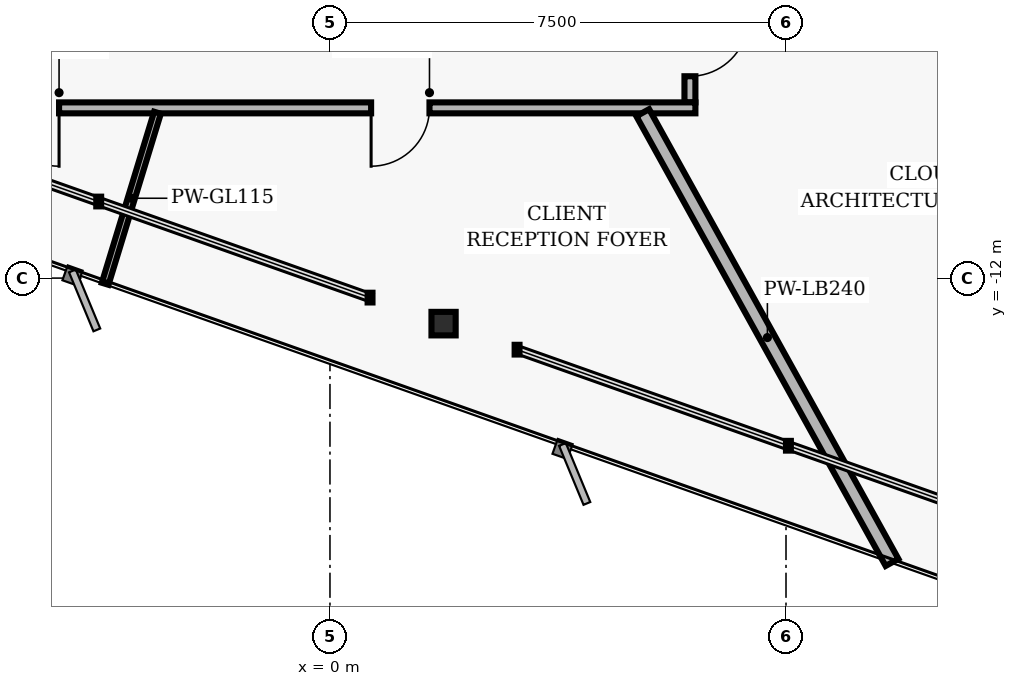
"""IFC4 building model, lengths in metres.
Left out: names, types, materials, properties, quantities, classifications, styles, units other than length and angle.
Written with IfcOpenShell. Run it as: python <this file> out.ifc"""

import sys

from ifc_helpers import new_model, si_unit, direction, frame, frame_2d, origin, origin_2d, place, context, subcontext, project, spatial, rectangle, i_section, extrude, element, fill, save


model = new_model("IFC4")
c1 = context("Model", 3, precision=1e-05, world=origin(), true_north=direction((0.0, 1.0)))
c2 = subcontext(c1, "Body", "Model", "MODEL_VIEW")
j1 = project(units=[si_unit("LENGTHUNIT", "METRE"), si_unit("PLANEANGLEUNIT", "RADIAN")], contexts=[c1])
p1 = place(None, origin())
s1 = spatial("IfcSite", under=j1, at=p1, CompositionType="ELEMENT")
p2 = place(p1, origin())
s2 = spatial("IfcBuilding", under=s1, at=p2, CompositionType="ELEMENT")
p3 = place(p2, frame((0.0, 0.0, 175.36)))
s3 = spatial("IfcBuildingStorey", under=s2, at=p3, CompositionType="ELEMENT", Elevation=175.36)
p4 = place(p3, frame((1.868, -12.749, 0.0), z_axis=(0.0, 0.0, 1.0), x_axis=(1.0, 0.0, 0.0)))
e1 = element("IfcColumn", 1, at=p4, inside=s3, PredefinedType="COLUMN", context=c2, shape_type="SweptSolid", body=[
    extrude(i_section(OverallWidth=0.398, OverallDepth=0.387, WebThickness=0.021, FlangeThickness=0.033, FilletRadius=0.018, at=origin_2d()), origin(), (0.0, 0.0, 1.0), 3.04),
])
p5 = place(p3, frame((5.92, -7.29, 0.0), z_axis=(0.0, 0.0, 1.0), x_axis=(0.0, -1.0, 0.0)))
e2 = element("IfcWall", 2, at=p5, inside=s3, PredefinedType="PARTITIONING", context=c2, shape_type="SweptSolid", body=[
    extrude(rectangle(XDim=1.82, YDim=0.18, at=frame_2d((0.91, 0.0))), origin(), (0.0, 0.0, 1.0), 2.773),
])
p6 = place(p5, frame((0.43, 0.0, 0.0)))
e3 = element("IfcOpeningElement", 3, at=p6, cuts=e2, PredefinedType="OPENING", context=c2, shape_type="SweptSolid", body=[
    extrude(rectangle(XDim=0.96, YDim=2.02, at=frame_2d((0.48, 1.01))), frame((0.0, 0.1, 0.0), z_axis=(0.0, -1.0, 0.0), x_axis=(1.0, 0.0, 0.0)), (0.0, 0.0, 1.0), 0.2),
])
p7 = place(p3, frame((6.01, -9.2, 0.0), z_axis=(0.0, 0.0, 1.0), x_axis=(-1.0, 0.0, 0.0)))
e4 = element("IfcWall", 4, at=p7, inside=s3, PredefinedType="PARTITIONING", context=c2, shape_type="SweptSolid", body=[
    extrude(rectangle(XDim=13.3, YDim=0.18, at=frame_2d((6.65, 0.0))), origin(), (0.0, 0.0, 1.0), 2.395),
])
p8 = place(p7, frame((10.465, 0.0, 0.0)))
e5 = element("IfcOpeningElement", 5, at=p8, cuts=e4, PredefinedType="OPENING", context=c2, shape_type="SweptSolid", body=[
    extrude(rectangle(XDim=0.96, YDim=2.02, at=frame_2d((0.48, 1.01))), frame((0.0, 0.1, 0.0), z_axis=(0.0, -1.0, 0.0), x_axis=(1.0, 0.0, 0.0)), (0.0, 0.0, 1.0), 0.2),
])
p9 = place(p7, frame((4.373, 0.0, 0.0)))
e6 = element("IfcOpeningElement", 6, at=p9, cuts=e4, PredefinedType="OPENING", context=c2, shape_type="SweptSolid", body=[
    extrude(rectangle(XDim=0.96, YDim=2.02, at=frame_2d((0.48, 1.01))), frame((0.0, 0.1, 0.0), z_axis=(0.0, -1.0, 0.0), x_axis=(1.0, 0.0, 0.0)), (0.0, 0.0, 1.0), 0.2),
])
p10 = place(p3, frame((-2.837, -9.28, 0.0), z_axis=(0.0, 0.0, 1.0), x_axis=(-0.292353462598, -0.95631033295, 0.0)))
e7 = element("IfcWall", 7, at=p10, inside=s3, PredefinedType="MOVABLE", context=c2, shape_type="SweptSolid", body=[
    extrude(rectangle(XDim=2.942, YDim=0.115, at=frame_2d((1.471, 0.0))), origin(), (0.0, 0.0, 1.0), 2.773),
])
p11 = place(p3, frame((5.144, -9.28, 0.0), z_axis=(0.0, 0.0, 1.0), x_axis=(0.484804355006, -0.874622625689, 0.0)))
e8 = element("IfcWall", 8, at=p11, inside=s3, PredefinedType="PARTITIONING", context=c2, shape_type="SweptSolid", body=[
    extrude(rectangle(XDim=8.456, YDim=0.24, at=frame_2d((4.228, 0.0))), origin(), (0.0, 0.0, 1.0), 2.773),
])
p12 = place(p8, origin())
e9 = element("IfcDoor", 9, at=p12, inside=s3, OperationType="SINGLE_SWING_LEFT", PredefinedType="DOOR", context=c2, shape_type="SweptSolid", body=[
    extrude(rectangle(XDim=0.96, YDim=2.02, at=frame_2d((0.48, 1.01))), frame((0.0, 0.025, 0.0), z_axis=(0.0, -1.0, 0.0), x_axis=(1.0, 0.0, 0.0)), (0.0, 0.0, 1.0), 0.05),
])
fill(e5, e9)
p13 = place(p9, origin())
e10 = element("IfcDoor", 10, at=p13, inside=s3, OperationType="SINGLE_SWING_RIGHT", PredefinedType="DOOR", context=c2, shape_type="SweptSolid", body=[
    extrude(rectangle(XDim=0.96, YDim=2.02, at=frame_2d((0.48, 1.01))), frame((0.0, 0.025, 0.0), z_axis=(0.0, -1.0, 0.0), x_axis=(1.0, 0.0, 0.0)), (0.0, 0.0, 1.0), 0.05),
])
fill(e6, e10)
p14 = place(p6, origin())
e11 = element("IfcDoor", 11, at=p14, inside=s3, OperationType="SINGLE_SWING_LEFT", PredefinedType="DOOR", context=c2, shape_type="SweptSolid", body=[
    extrude(rectangle(XDim=0.96, YDim=2.02, at=frame_2d((0.48, 1.01))), frame((0.0, 0.025, 0.0), z_axis=(0.0, -1.0, 0.0), x_axis=(1.0, 0.0, 0.0)), (0.0, 0.0, 1.0), 0.05),
])
fill(e3, e11)
save(model, sys.argv[1])
